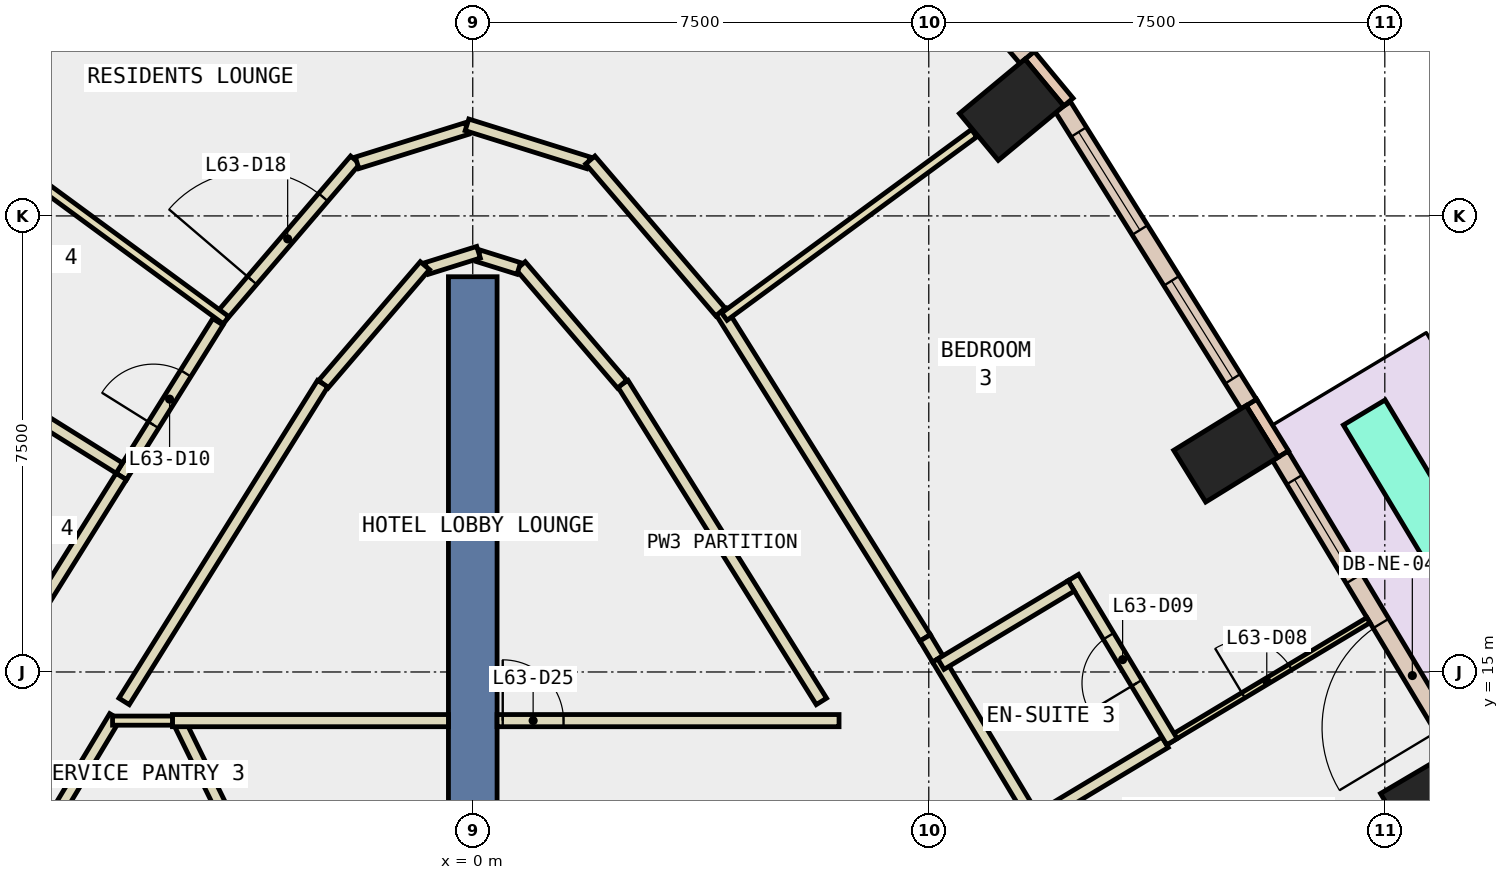
"""IFC4 building model, lengths in metres.
Left out: names, types, materials, properties, quantities, classifications, styles, units other than length and angle.
Written with IfcOpenShell. Run it as: python <this file> out.ifc"""

import sys

from ifc_helpers import new_model, si_unit, direction, frame, frame_2d, origin, origin_2d, place, context, subcontext, project, spatial, rectangle, extrude, element, fill, save


model = new_model("IFC4")
c1 = context("Model", 3, precision=1e-05, world=origin(), true_north=direction((0.0, 1.0)))
c2 = subcontext(c1, "Body", "Model", "MODEL_VIEW")
j1 = project(units=[si_unit("LENGTHUNIT", "METRE"), si_unit("PLANEANGLEUNIT", "RADIAN")], contexts=[c1])
p1 = place(None, origin())
s1 = spatial("IfcSite", under=j1, at=p1, CompositionType="ELEMENT")
p2 = place(p1, origin())
s2 = spatial("IfcBuilding", under=s1, at=p2, CompositionType="ELEMENT")
p3 = place(p2, frame((0.0, 0.0, 273.8)))
s3 = spatial("IfcBuildingStorey", under=s2, at=p3, CompositionType="ELEMENT", Elevation=273.8)
for number, where, z_axis, x_axis in (
    (1, (15.787, 12.927, -0.34), (0.0, 0.0, 1.0), (-0.509, 0.861, 0.0)),
    (2, (12.387, 18.588, -0.34), (0.0, 0.0, 1.0), (-0.526, 0.851, 0.0)),
    (3, (8.862, 24.246, -0.34), (0.0, 0.0, 1.0), (-0.639, 0.769, 0.0)),
):
    element("IfcColumn", number, at=place(p3, frame(where, z_axis=z_axis, x_axis=x_axis)), inside=s3, PredefinedType="COLUMN", context=c2, shape_type="SweptSolid", body=[
        extrude(rectangle(XDim=1.0, YDim=1.4, at=origin_2d()), origin(), (0.0, 0.0, 1.0), 3.6),
    ])
p4 = place(p3, frame((0.0, 12.5, -0.34), z_axis=(0.0, 0.0, 1.0), x_axis=(0.0, 1.0, 0.0)))
e4 = element("IfcWall", 4, at=p4, inside=s3, PredefinedType="SHEAR", context=c2, shape_type="SweptSolid", body=[
    extrude(rectangle(XDim=9.0, YDim=0.8, at=frame_2d((4.5, 0.0))), origin(), (0.0, 0.0, 1.0), 3.6),
])
p5 = place(p3, frame((13.331, 18.583, 0.0), z_axis=(0.0, 0.0, 1.0), x_axis=(-0.525825307325, 0.850592585306, 0.0)))
e5 = element("IfcWall", 5, at=p5, inside=s3, PredefinedType="STANDARD", context=c2, shape_type="SweptSolid", body=[
    extrude(rectangle(XDim=1.0, YDim=0.2, at=frame_2d((0.5, 0.0))), origin(), (0.0, 0.0, 1.0), 3.26),
])
p6 = place(p3, frame((9.796, 24.372, 0.0), z_axis=(0.0, 0.0, 1.0), x_axis=(-0.637972365578, 0.770059257953, 0.0)))
e6 = element("IfcWall", 6, at=p6, inside=s3, PredefinedType="STANDARD", context=c2, shape_type="SweptSolid", body=[
    extrude(rectangle(XDim=1.0, YDim=0.2, at=frame_2d((0.5, 0.0))), origin(), (0.0, 0.0, 1.0), 3.26),
])
p7 = place(p3, frame((16.176, 13.737, 0.0), z_axis=(0.0, 0.0, 1.0), x_axis=(-0.515006791362, 0.857186096977, 0.0)))
e7 = element("IfcWall", 7, at=p7, inside=s3, PredefinedType="STANDARD", context=c2, shape_type="SweptSolid", body=[
    extrude(rectangle(XDim=5.619, YDim=0.3, at=frame_2d((2.81, 0.0))), origin(), (0.0, 0.0, 1.0), 3.26),
])
p8 = place(p7, frame((0.405, 0.0, 0.0)))
e8 = element("IfcOpeningElement", 8, at=p8, cuts=e7, PredefinedType="OPENING", context=c2, shape_type="SweptSolid", body=[
    extrude(rectangle(XDim=2.0, YDim=2.4, at=frame_2d((1.0, 1.2))), frame((0.0, 0.16, 0.0), z_axis=(0.0, -1.0, 0.0), x_axis=(1.0, 0.0, 0.0)), (0.0, 0.0, 1.0), 0.32),
])
p9 = place(p7, frame((3.265, 0.0, 0.9)))
e9 = element("IfcOpeningElement", 9, at=p9, cuts=e7, PredefinedType="OPENING", context=c2, shape_type="SweptSolid", body=[
    extrude(rectangle(XDim=1.9, YDim=2.0, at=frame_2d((0.95, 1.0))), frame((0.0, 0.16, 0.0), z_axis=(0.0, -1.0, 0.0), x_axis=(1.0, 0.0, 0.0)), (0.0, 0.0, 1.0), 0.32),
])
p10 = place(p3, frame((12.761, 19.405, 0.0), z_axis=(0.0, 0.0, 1.0), x_axis=(-0.529915244244, 0.848050608111, 0.0)))
e10 = element("IfcWall", 10, at=p10, inside=s3, PredefinedType="STANDARD", context=c2, shape_type="SweptSolid", body=[
    extrude(rectangle(XDim=5.769, YDim=0.3, at=frame_2d((2.884, 0.0))), origin(), (0.0, 0.0, 1.0), 3.26),
])
p11 = place(p10, frame((0.492, 0.0, 0.9)))
e11 = element("IfcOpeningElement", 11, at=p11, cuts=e10, PredefinedType="OPENING", context=c2, shape_type="SweptSolid", body=[
    extrude(rectangle(XDim=1.9, YDim=2.0, at=frame_2d((0.95, 1.0))), frame((0.0, 0.16, 0.0), z_axis=(0.0, -1.0, 0.0), x_axis=(1.0, 0.0, 0.0)), (0.0, 0.0, 1.0), 0.32),
])
p12 = place(p10, frame((3.376, 0.0, 0.9)))
e12 = element("IfcOpeningElement", 12, at=p12, cuts=e10, PredefinedType="OPENING", context=c2, shape_type="SweptSolid", body=[
    extrude(rectangle(XDim=1.9, YDim=2.0, at=frame_2d((0.95, 1.0))), frame((0.0, 0.16, 0.0), z_axis=(0.0, -1.0, 0.0), x_axis=(1.0, 0.0, 0.0)), (0.0, 0.0, 1.0), 0.32),
])
p13 = place(p3, frame((9.114, 25.104, 0.0), z_axis=(0.0, 0.0, 1.0), x_axis=(-0.650534879197, 0.759476379454, 0.0)))
e13 = element("IfcWall", 13, at=p13, inside=s3, PredefinedType="STANDARD", context=c2, shape_type="SweptSolid", body=[
    extrude(rectangle(XDim=4.625, YDim=0.3, at=frame_2d((2.313, 0.0))), origin(), (0.0, 0.0, 1.0), 3.26),
])
p14 = place(p13, frame((1.613, 0.0, 0.9)))
e14 = element("IfcOpeningElement", 14, at=p14, cuts=e13, PredefinedType="OPENING", context=c2, shape_type="SweptSolid", body=[
    extrude(rectangle(XDim=1.4, YDim=2.0, at=frame_2d((0.7, 1.0))), frame((0.0, 0.16, 0.0), z_axis=(0.0, -1.0, 0.0), x_axis=(1.0, 0.0, 0.0)), (0.0, 0.0, 1.0), 0.32),
])
p15 = place(p3, frame((-6.105, 28.617, 0.0), z_axis=(0.0, 0.0, 1.0), x_axis=(-0.650534879197, -0.759476379454, 0.0)))
e15 = element("IfcWall", 15, at=p15, inside=s3, PredefinedType="STANDARD", context=c2, shape_type="SweptSolid", body=[
    extrude(rectangle(XDim=4.625, YDim=0.3, at=frame_2d((2.313, 0.0))), origin(), (0.0, 0.0, 1.0), 3.26),
])
p16 = place(p15, frame((1.613, 0.0, 0.9)))
e16 = element("IfcOpeningElement", 16, at=p16, cuts=e15, PredefinedType="OPENING", context=c2, shape_type="SweptSolid", body=[
    extrude(rectangle(XDim=1.4, YDim=2.0, at=frame_2d((0.7, 1.0))), frame((0.0, 0.16, 0.0), z_axis=(0.0, -1.0, 0.0), x_axis=(1.0, 0.0, 0.0)), (0.0, 0.0, 1.0), 0.32),
])
p17 = place(p3, frame((17.453, 14.62, 0.0), z_axis=(0.0, 0.0, 1.0), x_axis=(-0.514846755633, 0.857282227865, 0.0)))
e17 = element("IfcWall", 17, at=p17, inside=s3, PredefinedType="STANDARD", context=c2, shape_type="SweptSolid", body=[
    extrude(rectangle(XDim=5.421, YDim=0.8, at=frame_2d((2.71, 0.0))), origin(), (0.0, 0.0, 1.0), 0.8),
])
p18 = place(p3, frame((-4.005, 12.5, 0.0), z_axis=(0.0, 0.0, 1.0), x_axis=(-0.440355460167, 0.89782351757, 0.0)))
e18 = element("IfcWall", 18, at=p18, inside=s3, PredefinedType="PARTITIONING", context=c2, shape_type="SweptSolid", body=[
    extrude(rectangle(XDim=1.869, YDim=0.2, at=frame_2d((0.935, 0.0))), origin(), (0.0, 0.0, 1.0), 3.26),
])
p19 = place(p3, frame((-5.885, 14.264, 0.0), z_axis=(0.0, 0.0, 1.0), x_axis=(-0.514971458129, -0.857207324579, 0.0)))
e19 = element("IfcWall", 19, at=p19, inside=s3, PredefinedType="PARTITIONING", context=c2, shape_type="SweptSolid", body=[
    extrude(rectangle(XDim=4.83, YDim=0.2, at=frame_2d((2.415, 0.0))), origin(), (0.0, 0.0, 1.0), 3.26),
])
p20 = place(p19, frame((1.915, 0.0, 0.0)))
e20 = element("IfcOpeningElement", 20, at=p20, cuts=e19, PredefinedType="OPENING", context=c2, shape_type="SweptSolid", body=[
    extrude(rectangle(XDim=1.0, YDim=2.1, at=frame_2d((0.5, 1.05))), frame((0.0, 0.11, 0.0), z_axis=(0.0, -1.0, 0.0), x_axis=(1.0, 0.0, 0.0)), (0.0, 0.0, 1.0), 0.22),
])
p21 = place(p3, frame((-4.939, 14.2, 0.0), z_axis=(0.0, 0.0, 1.0), x_axis=(1.0, 0.0, 0.0)))
e21 = element("IfcWall", 21, at=p21, inside=s3, PredefinedType="PARTITIONING", context=c2, shape_type="SweptSolid", body=[
    extrude(rectangle(XDim=4.539, YDim=0.2, at=frame_2d((2.27, 0.0))), origin(), (0.0, 0.0, 1.0), 3.26),
])
p22 = place(p3, frame((5.734, 14.516, 0.0), z_axis=(0.0, 0.0, 1.0), x_axis=(-0.529852912827, 0.848089553508, 0.0)))
e22 = element("IfcWall", 22, at=p22, inside=s3, PredefinedType="PARTITIONING", context=c2, shape_type="SweptSolid", body=[
    extrude(rectangle(XDim=6.162, YDim=0.2, at=frame_2d((3.081, 0.0))), origin(), (0.0, 0.0, 1.0), 3.26),
])
p23 = place(p3, frame((2.457, 19.733, 0.0), z_axis=(0.0, 0.0, 1.0), x_axis=(-0.650650354416, 0.759377453114, 0.0)))
e23 = element("IfcWall", 23, at=p23, inside=s3, PredefinedType="PARTITIONING", context=c2, shape_type="SweptSolid", body=[
    extrude(rectangle(XDim=2.567, YDim=0.2, at=frame_2d((1.283, 0.0))), origin(), (0.0, 0.0, 1.0), 3.26),
])
p24 = place(p3, frame((0.757, 21.636, 0.0), z_axis=(0.0, 0.0, 1.0), x_axis=(-0.954429868001, 0.298435297959, 0.0)))
e24 = element("IfcWall", 24, at=p24, inside=s3, PredefinedType="PARTITIONING", context=c2, shape_type="SweptSolid", body=[
    extrude(rectangle(XDim=0.694, YDim=0.2, at=frame_2d((0.347, 0.0))), origin(), (0.0, 0.0, 1.0), 3.26),
])
p25 = place(p3, frame((0.095, 21.903, 0.0), z_axis=(0.0, 0.0, 1.0), x_axis=(-0.954216896292, -0.299115554311, 0.0)))
e25 = element("IfcWall", 25, at=p25, inside=s3, PredefinedType="PARTITIONING", context=c2, shape_type="SweptSolid", body=[
    extrude(rectangle(XDim=0.893, YDim=0.2, at=frame_2d((0.446, 0.0))), origin(), (0.0, 0.0, 1.0), 3.26),
])
p26 = place(p3, frame((-0.787, 21.682, 0.0), z_axis=(0.0, 0.0, 1.0), x_axis=(-0.650650354416, -0.759377453114, 0.0)))
e26 = element("IfcWall", 26, at=p26, inside=s3, PredefinedType="PARTITIONING", context=c2, shape_type="SweptSolid", body=[
    extrude(rectangle(XDim=2.567, YDim=0.2, at=frame_2d((1.283, 0.0))), origin(), (0.0, 0.0, 1.0), 3.26),
])
p27 = place(p3, frame((-2.469, 19.742, 0.0), z_axis=(0.0, 0.0, 1.0), x_axis=(-0.529852912827, -0.848089553508, 0.0)))
e27 = element("IfcWall", 27, at=p27, inside=s3, PredefinedType="PARTITIONING", context=c2, shape_type="SweptSolid", body=[
    extrude(rectangle(XDim=6.162, YDim=0.2, at=frame_2d((3.081, 0.0))), origin(), (0.0, 0.0, 1.0), 3.26),
])
p28 = place(p3, frame((4.085, 20.929, 0.0), z_axis=(0.0, 0.0, 1.0), x_axis=(0.530002406791, -0.847996137253, 0.0)))
e28 = element("IfcWall", 28, at=p28, inside=s3, PredefinedType="PARTITIONING", context=c2, shape_type="SweptSolid", body=[
    extrude(rectangle(XDim=6.33, YDim=0.2, at=frame_2d((3.165, 0.0))), origin(), (0.0, 0.0, 1.0), 3.26),
])
p29 = place(p3, frame((7.44, 15.561, 0.0), z_axis=(0.0, 0.0, 1.0), x_axis=(0.514229456049, -0.857652649114, 0.0)))
e29 = element("IfcWall", 29, at=p29, inside=s3, PredefinedType="PARTITIONING", context=c2, shape_type="SweptSolid", body=[
    extrude(rectangle(XDim=0.405, YDim=0.2, at=frame_2d((0.202, 0.0))), origin(), (0.0, 0.0, 1.0), 3.26),
])
p30 = place(p3, frame((7.648, 15.214, 0.0), z_axis=(0.0, 0.0, 1.0), x_axis=(0.515118014871, -0.857119262854, 0.0)))
e30 = element("IfcWall", 30, at=p30, inside=s3, PredefinedType="PARTITIONING", context=c2, shape_type="SweptSolid", body=[
    extrude(rectangle(XDim=3.0, YDim=0.2, at=frame_2d((1.5, 0.0))), origin(), (0.0, 0.0, 1.0), 3.26),
])
p31 = place(p3, frame((-4.155, 20.825, 0.0), z_axis=(0.0, 0.0, 1.0), x_axis=(0.650396970678, 0.75959448427, 0.0)))
e31 = element("IfcWall", 31, at=p31, inside=s3, PredefinedType="PARTITIONING", context=c2, shape_type="SweptSolid", body=[
    extrude(rectangle(XDim=3.416, YDim=0.2, at=frame_2d((1.708, 0.0))), origin(), (0.0, 0.0, 1.0), 3.26),
])
p32 = place(p31, frame((0.808, 0.0, 0.0)))
e32 = element("IfcOpeningElement", 32, at=p32, cuts=e31, PredefinedType="OPENING", context=c2, shape_type="SweptSolid", body=[
    extrude(rectangle(XDim=1.8, YDim=2.1, at=frame_2d((0.9, 1.05))), frame((0.0, 0.11, 0.0), z_axis=(0.0, -1.0, 0.0), x_axis=(1.0, 0.0, 0.0)), (0.0, 0.0, 1.0), 0.22),
])
p33 = place(p3, frame((-1.902, 23.373, 0.0), z_axis=(0.0, 0.0, 1.0), x_axis=(0.954447851072, 0.298377779976, 0.0)))
e33 = element("IfcWall", 33, at=p33, inside=s3, PredefinedType="PARTITIONING", context=c2, shape_type="SweptSolid", body=[
    extrude(rectangle(XDim=1.893, YDim=0.2, at=frame_2d((0.947, 0.0))), origin(), (0.0, 0.0, 1.0), 3.26),
])
p34 = place(p3, frame((-0.095, 23.998, 0.0), z_axis=(0.0, 0.0, 1.0), x_axis=(0.954355336779, -0.298673552831, 0.0)))
e34 = element("IfcWall", 34, at=p34, inside=s3, PredefinedType="PARTITIONING", context=c2, shape_type="SweptSolid", body=[
    extrude(rectangle(XDim=2.093, YDim=0.2, at=frame_2d((1.046, 0.0))), origin(), (0.0, 0.0, 1.0), 3.26),
])
p35 = place(p3, frame((1.933, 23.42, 0.0), z_axis=(0.0, 0.0, 1.0), x_axis=(0.65027189398, -0.759701562391, 0.0)))
e35 = element("IfcWall", 35, at=p35, inside=s3, PredefinedType="PARTITIONING", context=c2, shape_type="SweptSolid", body=[
    extrude(rectangle(XDim=3.291, YDim=0.2, at=frame_2d((1.646, 0.0))), origin(), (0.0, 0.0, 1.0), 3.26),
])
p36 = place(p3, frame((-5.781, 18.215, 0.0), z_axis=(0.0, 0.0, 1.0), x_axis=(0.530028199927, 0.847980015851, 0.0)))
e36 = element("IfcWall", 36, at=p36, inside=s3, PredefinedType="PARTITIONING", context=c2, shape_type="SweptSolid", body=[
    extrude(rectangle(XDim=3.0, YDim=0.2, at=frame_2d((1.5, 0.0))), origin(), (0.0, 0.0, 1.0), 3.26),
])
p37 = place(p36, frame((1.0, 0.0, 0.0)))
e37 = element("IfcOpeningElement", 37, at=p37, cuts=e36, PredefinedType="OPENING", context=c2, shape_type="SweptSolid", body=[
    extrude(rectangle(XDim=1.0, YDim=2.1, at=frame_2d((0.5, 1.05))), frame((0.0, 0.11, 0.0), z_axis=(0.0, -1.0, 0.0), x_axis=(1.0, 0.0, 0.0)), (0.0, 0.0, 1.0), 0.22),
])
p38 = place(p3, frame((-7.371, 15.671, 0.0), z_axis=(0.0, 0.0, 1.0), x_axis=(0.529991625428, 0.84800287557, 0.0)))
e38 = element("IfcWall", 38, at=p38, inside=s3, PredefinedType="PARTITIONING", context=c2, shape_type="SweptSolid", body=[
    extrude(rectangle(XDim=3.0, YDim=0.2, at=frame_2d((1.5, 0.0))), origin(), (0.0, 0.0, 1.0), 3.26),
])
p39 = place(p3, frame((-4.939, 14.2, 0.0), z_axis=(0.0, 0.0, 1.0), x_axis=(-1.0, 0.0, 0.0)))
e39 = element("IfcWall", 39, at=p39, inside=s3, PredefinedType="PARTITIONING", context=c2, shape_type="SweptSolid", body=[
    extrude(rectangle(XDim=0.985, YDim=0.15, at=frame_2d((0.493, 0.0))), origin(), (0.0, 0.0, 1.0), 3.26),
])
p40 = place(p3, frame((11.387, 13.844, 0.0), z_axis=(0.0, 0.0, 1.0), x_axis=(0.857238721908, 0.514919191389, 0.0)))
e40 = element("IfcWall", 40, at=p40, inside=s3, PredefinedType="PARTITIONING", context=c2, shape_type="SweptSolid", body=[
    extrude(rectangle(XDim=3.9, YDim=0.1, at=frame_2d((1.95, 0.0))), origin(), (0.0, 0.0, 1.0), 3.26),
])
p41 = place(p40, frame((1.5, 0.0, 0.0)))
e41 = element("IfcOpeningElement", 41, at=p41, cuts=e40, PredefinedType="OPENING", context=c2, shape_type="SweptSolid", body=[
    extrude(rectangle(XDim=0.9, YDim=2.1, at=frame_2d((0.45, 1.05))), frame((0.0, 0.06, 0.0), z_axis=(0.0, -1.0, 0.0), x_axis=(1.0, 0.0, 0.0)), (0.0, 0.0, 1.0), 0.12),
])
p42 = place(p3, frame((9.244, 12.557, 0.0), z_axis=(0.0, 0.0, 1.0), x_axis=(0.857268798444, 0.514869116586, 0.0)))
e42 = element("IfcWall", 42, at=p42, inside=s3, PredefinedType="PARTITIONING", context=c2, shape_type="SweptSolid", body=[
    extrude(rectangle(XDim=2.5, YDim=0.2, at=frame_2d((1.25, 0.0))), origin(), (0.0, 0.0, 1.0), 3.26),
])
p43 = place(p3, frame((11.499, 13.853, 0.0), z_axis=(0.0, 0.0, 1.0), x_axis=(-0.514985817066, 0.857198698214, 0.0)))
e43 = element("IfcWall", 43, at=p43, inside=s3, PredefinedType="PARTITIONING", context=c2, shape_type="SweptSolid", body=[
    extrude(rectangle(XDim=3.15, YDim=0.2, at=frame_2d((1.575, 0.0))), origin(), (0.0, 0.0, 1.0), 3.26),
])
p44 = place(p43, frame((1.125, 0.0, 0.0)))
e44 = element("IfcOpeningElement", 44, at=p44, cuts=e43, PredefinedType="OPENING", context=c2, shape_type="SweptSolid", body=[
    extrude(rectangle(XDim=0.9, YDim=2.1, at=frame_2d((0.45, 1.05))), frame((0.0, 0.11, 0.0), z_axis=(0.0, -1.0, 0.0), x_axis=(1.0, 0.0, 0.0)), (0.0, 0.0, 1.0), 0.22),
])
p45 = place(p3, frame((9.842, 16.416, 0.0), z_axis=(0.0, 0.0, 1.0), x_axis=(-0.857268798444, -0.514869116586, 0.0)))
e45 = element("IfcWall", 45, at=p45, inside=s3, PredefinedType="PARTITIONING", context=c2, shape_type="SweptSolid", body=[
    extrude(rectangle(XDim=2.5, YDim=0.2, at=frame_2d((1.25, 0.0))), origin(), (0.0, 0.0, 1.0), 3.26),
])
p46 = place(p3, frame((4.138, 20.844, 0.0), z_axis=(0.0, 0.0, 1.0), x_axis=(0.805989075855, 0.591930409426, 0.0)))
e46 = element("IfcWall", 46, at=p46, inside=s3, PredefinedType="PARTITIONING", context=c2, shape_type="SweptSolid", body=[
    extrude(rectangle(XDim=5.097, YDim=0.15, at=frame_2d((2.548, 0.0))), origin(), (0.0, 0.0, 1.0), 3.26),
])
p47 = place(p3, frame((-4.058, 20.785, 0.0), z_axis=(0.0, 0.0, 1.0), x_axis=(-0.805947688418, 0.591986759593, 0.0)))
e47 = element("IfcWall", 47, at=p47, inside=s3, PredefinedType="PARTITIONING", context=c2, shape_type="SweptSolid", body=[
    extrude(rectangle(XDim=5.196, YDim=0.15, at=frame_2d((2.598, 0.0))), origin(), (0.0, 0.0, 1.0), 3.26),
])
p48 = place(p3, frame((-5.813, 18.353, 0.0), z_axis=(0.0, 0.0, 1.0), x_axis=(-0.847969725239, 0.530044663287, 0.0)))
e48 = element("IfcWall", 48, at=p48, inside=s3, PredefinedType="PARTITIONING", context=c2, shape_type="SweptSolid", body=[
    extrude(rectangle(XDim=2.4, YDim=0.2, at=frame_2d((1.2, 0.0))), origin(), (0.0, 0.0, 1.0), 3.26),
])
p49 = place(p3, frame((0.4, 14.2, 0.0), z_axis=(0.0, 0.0, 1.0), x_axis=(1.0, 0.0, 0.0)))
e49 = element("IfcWall", 49, at=p49, inside=s3, PredefinedType="PARTITIONING", context=c2, shape_type="SweptSolid", body=[
    extrude(rectangle(XDim=5.624, YDim=0.2, at=frame_2d((2.812, 0.0))), origin(), (0.0, 0.0, 1.0), 3.26),
])
p50 = place(p49, frame((0.093, 0.0, 0.0)))
e50 = element("IfcOpeningElement", 50, at=p50, cuts=e49, PredefinedType="OPENING", context=c2, shape_type="SweptSolid", body=[
    extrude(rectangle(XDim=1.0, YDim=2.1, at=frame_2d((0.5, 1.05))), frame((0.0, 0.11, 0.0), z_axis=(0.0, -1.0, 0.0), x_axis=(1.0, 0.0, 0.0)), (0.0, 0.0, 1.0), 0.22),
])
p51 = place(p8, origin())
e51 = element("IfcDoor", 51, at=p51, inside=s3, OperationType="SLIDING_TO_LEFT", PredefinedType="DOOR", context=c2, shape_type="SweptSolid", body=[
    extrude(rectangle(XDim=2.0, YDim=2.4, at=frame_2d((1.0, 1.2))), frame((0.0, 0.025, 0.0), z_axis=(0.0, -1.0, 0.0), x_axis=(1.0, 0.0, 0.0)), (0.0, 0.0, 1.0), 0.05),
])
fill(e8, e51)
p52 = place(p9, origin())
e52 = element("IfcWindow", 52, at=p52, inside=s3, PartitioningType="SINGLE_PANEL", PredefinedType="WINDOW", context=c2, shape_type="SweptSolid", body=[
    extrude(rectangle(XDim=1.9, YDim=2.0, at=frame_2d((0.95, 1.0))), frame((0.0, 0.03, 0.0), z_axis=(0.0, -1.0, 0.0), x_axis=(1.0, 0.0, 0.0)), (0.0, 0.0, 1.0), 0.06),
])
fill(e9, e52)
p53 = place(p11, origin())
e53 = element("IfcWindow", 53, at=p53, inside=s3, PartitioningType="SINGLE_PANEL", PredefinedType="WINDOW", context=c2, shape_type="SweptSolid", body=[
    extrude(rectangle(XDim=1.9, YDim=2.0, at=frame_2d((0.95, 1.0))), frame((0.0, 0.03, 0.0), z_axis=(0.0, -1.0, 0.0), x_axis=(1.0, 0.0, 0.0)), (0.0, 0.0, 1.0), 0.06),
])
fill(e11, e53)
p54 = place(p12, origin())
e54 = element("IfcWindow", 54, at=p54, inside=s3, PartitioningType="SINGLE_PANEL", PredefinedType="WINDOW", context=c2, shape_type="SweptSolid", body=[
    extrude(rectangle(XDim=1.9, YDim=2.0, at=frame_2d((0.95, 1.0))), frame((0.0, 0.03, 0.0), z_axis=(0.0, -1.0, 0.0), x_axis=(1.0, 0.0, 0.0)), (0.0, 0.0, 1.0), 0.06),
])
fill(e12, e54)
p55 = place(p41, origin())
e55 = element("IfcDoor", 55, at=p55, inside=s3, OperationType="SINGLE_SWING_LEFT", PredefinedType="DOOR", context=c2, shape_type="SweptSolid", body=[
    extrude(rectangle(XDim=0.9, YDim=2.1, at=frame_2d((0.45, 1.05))), frame((0.0, 0.025, 0.0), z_axis=(0.0, -1.0, 0.0), x_axis=(1.0, 0.0, 0.0)), (0.0, 0.0, 1.0), 0.05),
])
fill(e41, e55)
p56 = place(p44, origin())
e56 = element("IfcDoor", 56, at=p56, inside=s3, OperationType="SINGLE_SWING_LEFT", PredefinedType="DOOR", context=c2, shape_type="SweptSolid", body=[
    extrude(rectangle(XDim=0.9, YDim=2.1, at=frame_2d((0.45, 1.05))), frame((0.0, 0.025, 0.0), z_axis=(0.0, -1.0, 0.0), x_axis=(1.0, 0.0, 0.0)), (0.0, 0.0, 1.0), 0.05),
])
fill(e44, e56)
p57 = place(p37, origin())
e57 = element("IfcDoor", 57, at=p57, inside=s3, OperationType="SINGLE_SWING_RIGHT", PredefinedType="DOOR", context=c2, shape_type="SweptSolid", body=[
    extrude(rectangle(XDim=1.0, YDim=2.1, at=frame_2d((0.5, 1.05))), frame((0.0, 0.025, 0.0), z_axis=(0.0, -1.0, 0.0), x_axis=(1.0, 0.0, 0.0)), (0.0, 0.0, 1.0), 0.05),
])
fill(e37, e57)
p58 = place(p32, origin())
e58 = element("IfcDoor", 58, at=p58, inside=s3, OperationType="DOUBLE_DOOR_SINGLE_SWING", PredefinedType="DOOR", context=c2, shape_type="SweptSolid", body=[
    extrude(rectangle(XDim=1.8, YDim=2.1, at=frame_2d((0.9, 1.05))), frame((0.0, 0.025, 0.0), z_axis=(0.0, -1.0, 0.0), x_axis=(1.0, 0.0, 0.0)), (0.0, 0.0, 1.0), 0.05),
])
fill(e32, e58)
p59 = place(p50, origin())
e59 = element("IfcDoor", 59, at=p59, inside=s3, OperationType="SINGLE_SWING_LEFT", PredefinedType="DOOR", context=c2, shape_type="SweptSolid", body=[
    extrude(rectangle(XDim=1.0, YDim=2.1, at=frame_2d((0.5, 1.05))), frame((0.0, 0.025, 0.0), z_axis=(0.0, -1.0, 0.0), x_axis=(1.0, 0.0, 0.0)), (0.0, 0.0, 1.0), 0.05),
])
fill(e50, e59)
save(model, sys.argv[1])
